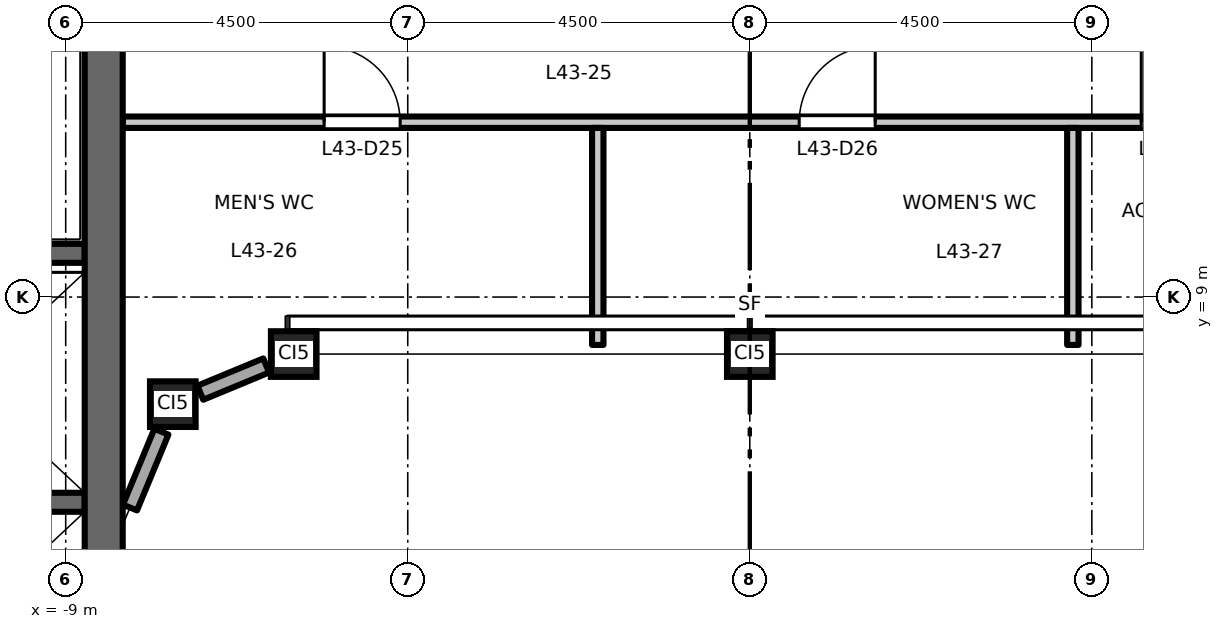
"""IFC4 building model, lengths in metres.
Left out: names, types, materials, properties, quantities, classifications, styles, units other than length and angle.
Written with IfcOpenShell. Run it as: python <this file> out.ifc"""

import sys

from ifc_helpers import new_model, si_unit, direction, frame, frame_2d, origin, origin_2d, place, context, subcontext, project, spatial, rectangle, hollow_rectangle, extrude, element, fill, save


model = new_model("IFC4")
c1 = context("Model", 3, precision=1e-05, world=origin(), true_north=direction((0.0, 1.0)))
c2 = subcontext(c1, "Body", "Model", "MODEL_VIEW")
j1 = project(units=[si_unit("LENGTHUNIT", "METRE"), si_unit("PLANEANGLEUNIT", "RADIAN")], contexts=[c1])
p1 = place(None, origin())
s1 = spatial("IfcSite", under=j1, at=p1, CompositionType="ELEMENT")
p2 = place(p1, origin())
s2 = spatial("IfcBuilding", under=s1, at=p2, CompositionType="ELEMENT")
p3 = place(p2, frame((0.0, 0.0, 201.7)))
s3 = spatial("IfcBuildingStorey", under=s2, at=p3, CompositionType="ELEMENT", Elevation=201.7)
for number, where, z_axis, x_axis in (
    (1, (-7.591, 7.591, 0.0), (0.0, 0.0, 1.0), (1.0, 0.0, 0.0)),
    (2, (-6.0, 8.25, 0.0), (0.0, 0.0, 1.0), (1.0, 0.0, 0.0)),
    (3, (0.0, 8.25, 0.0), (0.0, 0.0, 1.0), (1.0, 0.0, 0.0)),
):
    element("IfcColumn", number, at=place(p3, frame(where, z_axis=z_axis, x_axis=x_axis)), inside=s3, PredefinedType="COLUMN", context=c2, shape_type="SweptSolid", body=[
        extrude(hollow_rectangle(XDim=0.6, YDim=0.6, WallThickness=0.032, at=origin_2d()), origin(), (0.0, 0.0, 1.0), 4.5),
    ])
p4 = place(p3, frame((-8.75, 6.3, 0.0), z_axis=(0.0, 0.0, 1.0), x_axis=(-1.0, 0.0, 0.0)))
e4 = element("IfcWall", 4, at=p4, inside=s3, PredefinedType="SHEAR", context=c2, shape_type="SweptSolid", body=[
    extrude(rectangle(XDim=3.1, YDim=0.25, at=frame_2d((1.55, 0.0))), origin(), (0.0, 0.0, 1.0), 4.35),
])
p5 = place(p3, frame((-8.75, 9.575, 0.0), z_axis=(0.0, 0.0, 1.0), x_axis=(-1.0, 0.0, 0.0)))
e5 = element("IfcWall", 5, at=p5, inside=s3, PredefinedType="SHEAR", context=c2, shape_type="SweptSolid", body=[
    extrude(rectangle(XDim=8.0, YDim=0.25, at=frame_2d((4.0, 0.0))), origin(), (0.0, 0.0, 1.0), 4.35),
])
p6 = place(p5, frame((6.65, 0.0, 0.0)))
e6 = element("IfcOpeningElement", 6, at=p6, cuts=e5, PredefinedType="OPENING", context=c2, shape_type="SweptSolid", body=[
    extrude(rectangle(XDim=1.1, YDim=2.1, at=frame_2d((0.55, 1.05))), frame((0.0, 0.135, 0.0), z_axis=(0.0, -1.0, 0.0), x_axis=(1.0, 0.0, 0.0)), (0.0, 0.0, 1.0), 0.27),
])
p7 = place(p3, frame((-8.5, -13.0, 0.0), z_axis=(0.0, 0.0, 1.0), x_axis=(0.0, 1.0, 0.0)))
e7 = element("IfcWall", 7, at=p7, inside=s3, PredefinedType="SHEAR", context=c2, shape_type="SweptSolid", body=[
    extrude(rectangle(XDim=26.0, YDim=0.5, at=frame_2d((13.0, 0.0))), origin(), (0.0, 0.0, 1.0), 4.35),
])
p8 = place(p3, frame((-6.362, 8.1, 0.0), z_axis=(0.0, 0.0, 1.0), x_axis=(-0.923829670615, -0.382803787458, 0.0)))
e8 = element("IfcWall", 8, at=p8, inside=s3, PredefinedType="STANDARD", context=c2, shape_type="SweptSolid", body=[
    extrude(rectangle(XDim=0.938, YDim=0.2, at=frame_2d((0.469, 0.0))), origin(), (0.0, 0.0, 1.0), 3.918),
])
p9 = place(p3, frame((-7.741, 7.229, 0.0), z_axis=(0.0, 0.0, 1.0), x_axis=(-0.382704496366, -0.923870807235, 0.0)))
e9 = element("IfcWall", 9, at=p9, inside=s3, PredefinedType="STANDARD", context=c2, shape_type="SweptSolid", body=[
    extrude(rectangle(XDim=1.08, YDim=0.2, at=frame_2d((0.54, 0.0))), origin(), (0.0, 0.0, 1.0), 3.918),
])
p10 = place(p3, frame((-8.25, 11.3, 0.0), z_axis=(0.0, 0.0, 1.0), x_axis=(1.0, 0.0, 0.0)))
e10 = element("IfcWall", 10, at=p10, inside=s3, PredefinedType="PARTITIONING", context=c2, shape_type="SweptSolid", body=[
    extrude(rectangle(XDim=15.17, YDim=0.15, at=frame_2d((7.585, 0.0))), origin(), (0.0, 0.0, 1.0), 4.35),
])
p11 = place(p10, frame((2.65, 0.0, 0.0)))
e11 = element("IfcOpeningElement", 11, at=p11, cuts=e10, PredefinedType="OPENING", context=c2, shape_type="SweptSolid", body=[
    extrude(rectangle(XDim=1.0, YDim=2.1, at=frame_2d((0.5, 1.05))), frame((0.0, 0.085, 0.0), z_axis=(0.0, -1.0, 0.0), x_axis=(1.0, 0.0, 0.0)), (0.0, 0.0, 1.0), 0.17),
])
p12 = place(p10, frame((8.9, 0.0, 0.0)))
e12 = element("IfcOpeningElement", 12, at=p12, cuts=e10, PredefinedType="OPENING", context=c2, shape_type="SweptSolid", body=[
    extrude(rectangle(XDim=1.0, YDim=2.1, at=frame_2d((0.5, 1.05))), frame((0.0, 0.085, 0.0), z_axis=(0.0, -1.0, 0.0), x_axis=(1.0, 0.0, 0.0)), (0.0, 0.0, 1.0), 0.17),
])
p13 = place(p10, frame((13.4, 0.0, 0.0)))
e13 = element("IfcOpeningElement", 13, at=p13, cuts=e10, PredefinedType="OPENING", context=c2, shape_type="SweptSolid", body=[
    extrude(rectangle(XDim=1.0, YDim=2.1, at=frame_2d((0.5, 1.05))), frame((0.0, 0.085, 0.0), z_axis=(0.0, -1.0, 0.0), x_axis=(1.0, 0.0, 0.0)), (0.0, 0.0, 1.0), 0.17),
])
for number, where, z_axis, x_axis in (
    (14, (-2.0, 8.37, 0.0), (0.0, 0.0, 1.0), (0.0, 1.0, 0.0)),
    (15, (4.25, 8.37, 0.0), (0.0, 0.0, 1.0), (0.0, 1.0, 0.0)),
):
    element("IfcWall", number, at=place(p3, frame(where, z_axis=z_axis, x_axis=x_axis)), inside=s3, PredefinedType="PARTITIONING", context=c2, shape_type="SweptSolid", body=[
        extrude(rectangle(XDim=2.855, YDim=0.15, at=frame_2d((1.427, 0.0))), origin(), (0.0, 0.0, 1.0), 4.35),
    ])
p14 = place(p11, origin())
e16 = element("IfcDoor", 16, at=p14, inside=s3, OperationType="SINGLE_SWING_LEFT", PredefinedType="DOOR", context=c2, shape_type="SweptSolid", body=[
    extrude(rectangle(XDim=1.0, YDim=2.1, at=frame_2d((0.5, 1.05))), frame((0.0, 0.025, 0.0), z_axis=(0.0, -1.0, 0.0), x_axis=(1.0, 0.0, 0.0)), (0.0, 0.0, 1.0), 0.05),
])
fill(e11, e16)
p15 = place(p12, origin())
e17 = element("IfcDoor", 17, at=p15, inside=s3, OperationType="SINGLE_SWING_RIGHT", PredefinedType="DOOR", context=c2, shape_type="SweptSolid", body=[
    extrude(rectangle(XDim=1.0, YDim=2.1, at=frame_2d((0.5, 1.05))), frame((0.0, 0.025, 0.0), z_axis=(0.0, -1.0, 0.0), x_axis=(1.0, 0.0, 0.0)), (0.0, 0.0, 1.0), 0.05),
])
fill(e12, e17)
p16 = place(p13, origin())
e18 = element("IfcDoor", 18, at=p16, inside=s3, OperationType="SINGLE_SWING_LEFT", PredefinedType="DOOR", context=c2, shape_type="SweptSolid", body=[
    extrude(rectangle(XDim=1.0, YDim=2.1, at=frame_2d((0.5, 1.05))), frame((0.0, 0.025, 0.0), z_axis=(0.0, -1.0, 0.0), x_axis=(1.0, 0.0, 0.0)), (0.0, 0.0, 1.0), 0.05),
])
fill(e13, e18)
save(model, sys.argv[1])
